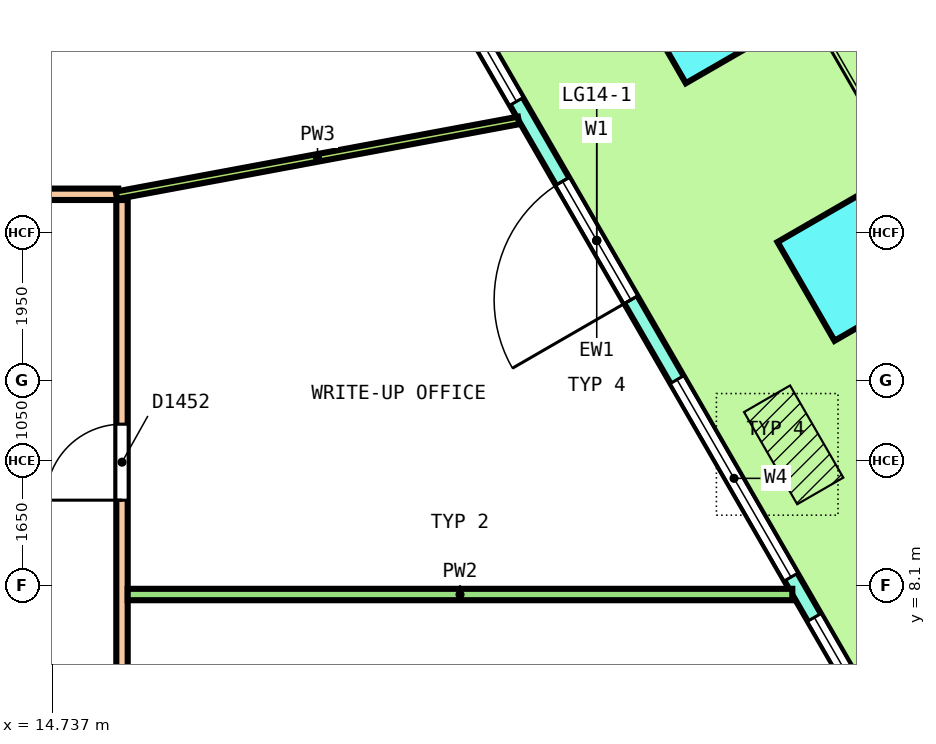
"""IFC4 building model, lengths in metres.
Left out: names, types, materials, properties, quantities, classifications, styles, units other than length and angle.
Written with IfcOpenShell. Run it as: python <this file> out.ifc"""

import sys

from ifc_helpers import new_model, si_unit, direction, frame, frame_2d, origin, origin_2d, place, context, subcontext, project, spatial, polyline, rectangle, outline, extrude, element, fill, save


model = new_model("IFC4")
c1 = context("Model", 3, precision=1e-05, world=origin(), true_north=direction((0.0, 1.0)))
c2 = subcontext(c1, "Body", "Model", "MODEL_VIEW")
j1 = project(units=[si_unit("LENGTHUNIT", "METRE"), si_unit("PLANEANGLEUNIT", "RADIAN")], contexts=[c1])
p1 = place(None, origin())
s1 = spatial("IfcSite", under=j1, at=p1, CompositionType="ELEMENT")
p2 = place(p1, origin())
s2 = spatial("IfcBuilding", under=s1, at=p2, CompositionType="ELEMENT")
p3 = place(p2, frame((0.0, 0.0, 63.0)))
s3 = spatial("IfcBuildingStorey", under=s2, at=p3, CompositionType="ELEMENT", Elevation=63.0)
for number, where, z_axis, x_axis in (
    (1, (25.299, 12.347, 0.0), (0.0, 0.0, 1.0), (-0.5, 0.866, 0.0)),
    (2, (23.342, 15.736, 0.0), (0.0, 0.0, 1.0), (-0.5, 0.866, 0.0)),
):
    element("IfcColumn", number, at=place(p3, frame(where, z_axis=z_axis, x_axis=x_axis)), inside=s3, PredefinedType="COLUMN", context=c2, shape_type="SweptSolid", body=[
        extrude(rectangle(XDim=1.5, YDim=1.5, at=origin_2d()), origin(), (0.0, 0.0, 1.0), 4.04),
    ])
p4 = place(p3, frame((26.411, 4.82, 0.0), z_axis=(0.0, 0.0, 1.0), x_axis=(-0.500000137386, 0.866025324465, 0.0)))
e3 = element("IfcWall", 3, at=p4, inside=s3, PredefinedType="SOLIDWALL", context=c2, shape_type="SweptSolid", body=[
    extrude(outline(polyline([(-0.027, -0.1), (0.979, -0.1), (1.986, -0.1), (2.992, -0.1), (3.999, -0.1), (5.005, -0.1), (6.012, -0.1), (7.018, -0.1), (8.025, -0.1), (9.031, -0.1), (10.038, -0.1), (11.044, -0.1), (12.051, -0.1), (13.057, -0.1), (14.063, -0.1), (15.07, -0.1), (16.076, -0.1), (17.083, -0.1), (18.089, -0.1), (18.036, 0.1), (17.035, 0.1), (16.035, 0.1), (15.034, 0.1), (14.034, 0.1), (13.033, 0.1), (12.033, 0.1), (11.032, 0.1), (10.032, 0.1), (9.031, 0.1), (8.031, 0.1), (7.03, 0.1), (6.03, 0.1), (5.029, 0.1), (4.029, 0.1), (3.028, 0.1), (2.028, 0.1), (1.027, 0.1), (0.027, 0.1), (-0.027, -0.1)])), origin(), (0.0, 0.0, 1.0), 4.1),
])
p5 = place(p4, frame((0.306, 0.0, 0.1)))
e4 = element("IfcOpeningElement", 4, at=p5, cuts=e3, PredefinedType="OPENING", context=c2, shape_type="SweptSolid", body=[
    extrude(rectangle(XDim=3.0, YDim=2.9, at=frame_2d((1.5, 1.45))), frame((0.0, 0.11, 0.0), z_axis=(0.0, -1.0, 0.0), x_axis=(1.0, 0.0, 0.0)), (0.0, 0.0, 1.0), 0.22),
])
p6 = place(p4, frame((3.919, 0.0, 0.1)))
e5 = element("IfcOpeningElement", 5, at=p6, cuts=e3, PredefinedType="OPENING", context=c2, shape_type="SweptSolid", body=[
    extrude(rectangle(XDim=3.0, YDim=2.9, at=frame_2d((1.5, 1.45))), frame((0.0, 0.11, 0.0), z_axis=(0.0, -1.0, 0.0), x_axis=(1.0, 0.0, 0.0)), (0.0, 0.0, 1.0), 0.22),
])
p7 = place(p4, frame((8.131, 0.0, 0.0)))
e6 = element("IfcOpeningElement", 6, at=p7, cuts=e3, PredefinedType="OPENING", context=c2, shape_type="SweptSolid", body=[
    extrude(rectangle(XDim=1.8, YDim=2.4, at=frame_2d((0.9, 1.2))), frame((0.0, 0.11, 0.0), z_axis=(0.0, -1.0, 0.0), x_axis=(1.0, 0.0, 0.0)), (0.0, 0.0, 1.0), 0.22),
])
p8 = place(p4, frame((8.131, 0.0, 2.55)))
e7 = element("IfcOpeningElement", 7, at=p8, cuts=e3, PredefinedType="OPENING", context=c2, shape_type="SweptSolid", body=[
    extrude(rectangle(XDim=1.8, YDim=0.45, at=frame_2d((0.9, 0.225))), frame((0.0, 0.11, 0.0), z_axis=(0.0, -1.0, 0.0), x_axis=(1.0, 0.0, 0.0)), (0.0, 0.0, 1.0), 0.22),
])
p9 = place(p4, frame((11.144, 0.0, 0.1)))
e8 = element("IfcOpeningElement", 8, at=p9, cuts=e3, PredefinedType="OPENING", context=c2, shape_type="SweptSolid", body=[
    extrude(rectangle(XDim=3.0, YDim=2.9, at=frame_2d((1.5, 1.45))), frame((0.0, 0.11, 0.0), z_axis=(0.0, -1.0, 0.0), x_axis=(1.0, 0.0, 0.0)), (0.0, 0.0, 1.0), 0.22),
])
p10 = place(p4, frame((14.756, 0.0, 0.1)))
e9 = element("IfcOpeningElement", 9, at=p10, cuts=e3, PredefinedType="OPENING", context=c2, shape_type="SweptSolid", body=[
    extrude(rectangle(XDim=3.0, YDim=2.9, at=frame_2d((1.5, 1.45))), frame((0.0, 0.11, 0.0), z_axis=(0.0, -1.0, 0.0), x_axis=(1.0, 0.0, 0.0)), (0.0, 0.0, 1.0), 0.22),
])
p11 = place(p3, frame((15.65, -13.175, 0.0), z_axis=(0.0, 0.0, 1.0), x_axis=(0.0, 1.0, 0.0)))
e10 = element("IfcWall", 10, at=p11, inside=s3, PredefinedType="PARTITIONING", context=c2, shape_type="SweptSolid", body=[
    extrude(rectangle(XDim=26.35, YDim=0.15, at=frame_2d((13.175, 0.0))), origin(), (0.0, 0.0, 1.0), 3.05),
])
p12 = place(p11, frame((16.576, 0.0, 0.0)))
e11 = element("IfcOpeningElement", 11, at=p12, cuts=e10, PredefinedType="OPENING", context=c2, shape_type="SweptSolid", body=[
    extrude(rectangle(XDim=1.2, YDim=2.1, at=frame_2d((0.6, 1.05))), frame((0.0, 0.085, 0.0), z_axis=(0.0, -1.0, 0.0), x_axis=(1.0, 0.0, 0.0)), (0.0, 0.0, 1.0), 0.17),
])
p13 = place(p11, frame((22.401, 0.0, 0.0)))
e12 = element("IfcOpeningElement", 12, at=p13, cuts=e10, PredefinedType="OPENING", context=c2, shape_type="SweptSolid", body=[
    extrude(rectangle(XDim=1.0, YDim=2.1, at=frame_2d((0.5, 1.05))), frame((0.0, 0.085, 0.0), z_axis=(0.0, -1.0, 0.0), x_axis=(1.0, 0.0, 0.0)), (0.0, 0.0, 1.0), 0.17),
])
p14 = place(p11, frame((1.65, 0.0, 0.0)))
e13 = element("IfcOpeningElement", 13, at=p14, cuts=e10, PredefinedType="OPENING", context=c2, shape_type="SweptSolid", body=[
    extrude(rectangle(XDim=1.0, YDim=2.1, at=frame_2d((0.5, 1.05))), frame((0.0, 0.085, 0.0), z_axis=(0.0, -1.0, 0.0), x_axis=(1.0, 0.0, 0.0)), (0.0, 0.0, 1.0), 0.17),
])
p15 = place(p3, frame((-15.575, 13.25, 0.0), z_axis=(0.0, 0.0, 1.0), x_axis=(1.0, 0.0, 0.0)))
e14 = element("IfcWall", 14, at=p15, inside=s3, PredefinedType="PARTITIONING", context=c2, shape_type="SweptSolid", body=[
    extrude(rectangle(XDim=31.175, YDim=0.15, at=frame_2d((15.587, 0.0))), origin(), (0.0, 0.0, 1.0), 3.05),
])
p16 = place(p15, frame((28.252, 0.0, 0.0)))
e15 = element("IfcOpeningElement", 15, at=p16, cuts=e14, PredefinedType="OPENING", context=c2, shape_type="SweptSolid", body=[
    extrude(rectangle(XDim=1.0, YDim=2.1, at=frame_2d((0.5, 1.05))), frame((0.0, 0.085, 0.0), z_axis=(0.0, -1.0, 0.0), x_axis=(1.0, 0.0, 0.0)), (0.0, 0.0, 1.0), 0.17),
])
p17 = place(p15, frame((14.802, 0.0, 0.0)))
e16 = element("IfcOpeningElement", 16, at=p17, cuts=e14, PredefinedType="OPENING", context=c2, shape_type="SweptSolid", body=[
    extrude(rectangle(XDim=1.2, YDim=2.1, at=frame_2d((0.6, 1.05))), frame((0.0, 0.085, 0.0), z_axis=(0.0, -1.0, 0.0), x_axis=(1.0, 0.0, 0.0)), (0.0, 0.0, 1.0), 0.17),
])
p18 = place(p15, frame((5.812, 0.0, 0.0)))
e17 = element("IfcOpeningElement", 17, at=p18, cuts=e14, PredefinedType="OPENING", context=c2, shape_type="SweptSolid", body=[
    extrude(rectangle(XDim=1.2, YDim=2.1, at=frame_2d((0.6, 1.05))), frame((0.0, 0.085, 0.0), z_axis=(0.0, -1.0, 0.0), x_axis=(1.0, 0.0, 0.0)), (0.0, 0.0, 1.0), 0.17),
])
p19 = place(p15, frame((0.849, 0.0, 0.0)))
e18 = element("IfcOpeningElement", 18, at=p19, cuts=e14, PredefinedType="OPENING", context=c2, shape_type="SweptSolid", body=[
    extrude(rectangle(XDim=1.2, YDim=2.1, at=frame_2d((0.6, 1.05))), frame((0.0, 0.085, 0.0), z_axis=(0.0, -1.0, 0.0), x_axis=(1.0, 0.0, 0.0)), (0.0, 0.0, 1.0), 0.17),
])
p20 = place(p3, frame((15.725, 7.985, 0.0), z_axis=(0.0, 0.0, 1.0), x_axis=(1.0, 0.0, 0.0)))
e19 = element("IfcWall", 19, at=p20, inside=s3, PredefinedType="PARTITIONING", context=c2, shape_type="SweptSolid", body=[
    extrude(rectangle(XDim=8.743, YDim=0.15, at=frame_2d((4.372, 0.0))), origin(), (0.0, 0.0, 1.0), 3.05),
])
p21 = place(p3, frame((15.576, 13.236, 0.0), z_axis=(0.0, 0.0, 1.0), x_axis=(0.983108608108, 0.183023126037, 0.0)))
e20 = element("IfcWall", 20, at=p21, inside=s3, PredefinedType="PARTITIONING", context=c2, shape_type="SweptSolid", body=[
    extrude(rectangle(XDim=5.382, YDim=0.1, at=frame_2d((2.691, 0.0))), origin(), (0.0, 0.0, 1.0), 3.05),
])
p22 = place(p5, origin())
e21 = element("IfcWindow", 21, at=p22, inside=s3, PartitioningType="SINGLE_PANEL", PredefinedType="WINDOW", context=c2, shape_type="SweptSolid", body=[
    extrude(rectangle(XDim=3.0, YDim=2.9, at=frame_2d((1.5, 1.45))), frame((0.0, 0.03, 0.0), z_axis=(0.0, -1.0, 0.0), x_axis=(1.0, 0.0, 0.0)), (0.0, 0.0, 1.0), 0.06),
])
fill(e4, e21)
p23 = place(p6, origin())
e22 = element("IfcWindow", 22, at=p23, inside=s3, PartitioningType="SINGLE_PANEL", PredefinedType="WINDOW", context=c2, shape_type="SweptSolid", body=[
    extrude(rectangle(XDim=3.0, YDim=2.9, at=frame_2d((1.5, 1.45))), frame((0.0, 0.03, 0.0), z_axis=(0.0, -1.0, 0.0), x_axis=(1.0, 0.0, 0.0)), (0.0, 0.0, 1.0), 0.06),
])
fill(e5, e22)
p24 = place(p7, origin())
e23 = element("IfcDoor", 23, at=p24, inside=s3, OperationType="DOUBLE_DOOR_SINGLE_SWING", PredefinedType="DOOR", context=c2, shape_type="SweptSolid", body=[
    extrude(rectangle(XDim=1.8, YDim=2.4, at=frame_2d((0.9, 1.2))), frame((0.0, 0.025, 0.0), z_axis=(0.0, -1.0, 0.0), x_axis=(1.0, 0.0, 0.0)), (0.0, 0.0, 1.0), 0.05),
])
fill(e6, e23)
p25 = place(p8, origin())
e24 = element("IfcWindow", 24, at=p25, inside=s3, PartitioningType="SINGLE_PANEL", PredefinedType="WINDOW", context=c2, shape_type="SweptSolid", body=[
    extrude(rectangle(XDim=1.8, YDim=0.45, at=frame_2d((0.9, 0.225))), frame((0.0, 0.03, 0.0), z_axis=(0.0, -1.0, 0.0), x_axis=(1.0, 0.0, 0.0)), (0.0, 0.0, 1.0), 0.06),
])
fill(e7, e24)
p26 = place(p9, origin())
e25 = element("IfcWindow", 25, at=p26, inside=s3, PartitioningType="SINGLE_PANEL", PredefinedType="WINDOW", context=c2, shape_type="SweptSolid", body=[
    extrude(rectangle(XDim=3.0, YDim=2.9, at=frame_2d((1.5, 1.45))), frame((0.0, 0.03, 0.0), z_axis=(0.0, -1.0, 0.0), x_axis=(1.0, 0.0, 0.0)), (0.0, 0.0, 1.0), 0.06),
])
fill(e8, e25)
p27 = place(p13, origin())
e26 = element("IfcDoor", 26, at=p27, inside=s3, OperationType="SINGLE_SWING_RIGHT", PredefinedType="DOOR", context=c2, shape_type="SweptSolid", body=[
    extrude(rectangle(XDim=1.0, YDim=2.1, at=frame_2d((0.5, 1.05))), frame((0.0, 0.025, 0.0), z_axis=(0.0, -1.0, 0.0), x_axis=(1.0, 0.0, 0.0)), (0.0, 0.0, 1.0), 0.05),
])
fill(e12, e26)
save(model, sys.argv[1])
